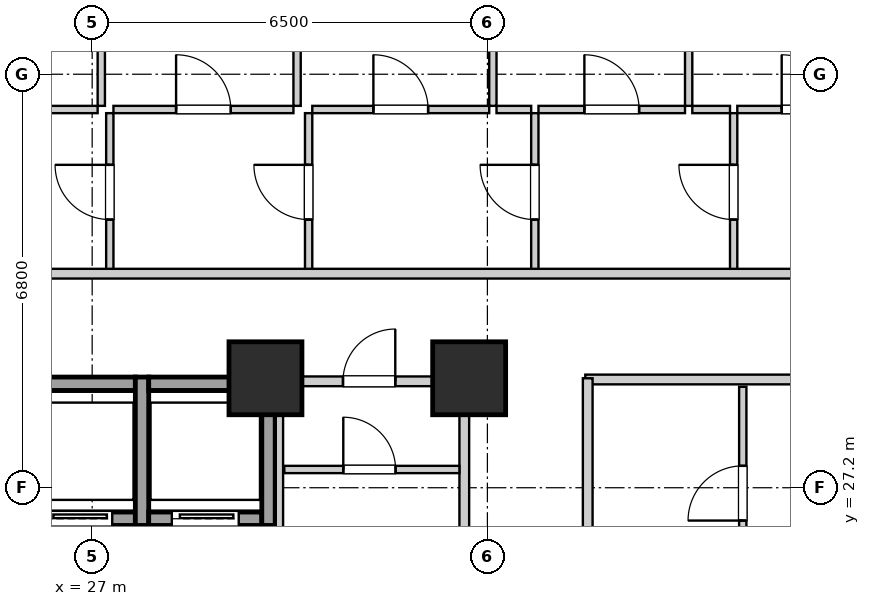
"""IFC4 building model, lengths in metres.
Left out: names, types, materials, properties, quantities, classifications, styles, units other than length and angle.
Written with IfcOpenShell. Run it as: python <this file> out.ifc"""

import sys

from ifc_helpers import new_model, si_unit, direction, frame, frame_2d, origin, origin_2d, place, context, subcontext, project, spatial, rectangle, extrude, element, fill, save


model = new_model("IFC4")
c1 = context("Model", 3, precision=1e-05, world=origin(), true_north=direction((0.0, 1.0)))
c2 = subcontext(c1, "Body", "Model", "MODEL_VIEW")
j1 = project(units=[si_unit("LENGTHUNIT", "METRE"), si_unit("PLANEANGLEUNIT", "RADIAN")], contexts=[c1])
p1 = place(None, origin())
s1 = spatial("IfcSite", under=j1, at=p1, CompositionType="ELEMENT")
p2 = place(p1, origin())
s2 = spatial("IfcBuilding", under=s1, at=p2, CompositionType="ELEMENT")
p3 = place(p2, frame((0.0, 0.0, 41.8)))
s3 = spatial("IfcBuildingStorey", under=s2, at=p3, CompositionType="ELEMENT", Elevation=41.8)
for number, where, z_axis, x_axis in (
    (1, (29.85, 29.0, 0.0), (0.0, 0.0, 1.0), (1.0, 0.0, 0.0)),
    (2, (33.2, 29.0, 0.0), (0.0, 0.0, 1.0), (1.0, 0.0, 0.0)),
):
    element("IfcColumn", number, at=place(p3, frame(where, z_axis=z_axis, x_axis=x_axis)), inside=s3, PredefinedType="COLUMN", context=c2, shape_type="SweptSolid", body=[
        extrude(rectangle(XDim=1.2, YDim=1.2, at=origin_2d()), origin(), (0.0, 0.0, 1.0), 3.2),
    ])
p4 = place(p3, frame((25.85, 26.69, 0.0), z_axis=(0.0, 0.0, 1.0), x_axis=(1.0, 0.0, 0.0)))
e3 = element("IfcWall", 3, at=p4, inside=s3, PredefinedType="SHEAR", context=c2, shape_type="SweptSolid", body=[
    extrude(rectangle(XDim=1.86, YDim=0.22, at=frame_2d((0.93, 0.0))), origin(), (0.0, 0.0, 1.0), 2.94),
])
p5 = place(p4, frame((0.38, 0.0, 0.0)))
e4 = element("IfcOpeningElement", 4, at=p5, cuts=e3, PredefinedType="OPENING", context=c2, shape_type="SweptSolid", body=[
    extrude(rectangle(XDim=1.1, YDim=2.15, at=frame_2d((0.55, 1.075))), frame((0.0, 0.12, 0.0), z_axis=(0.0, -1.0, 0.0), x_axis=(1.0, 0.0, 0.0)), (0.0, 0.0, 1.0), 0.24),
])
p6 = place(p3, frame((25.85, 28.91, 0.0), z_axis=(0.0, 0.0, 1.0), x_axis=(1.0, 0.0, 0.0)))
e5 = element("IfcWall", 5, at=p6, inside=s3, PredefinedType="SHEAR", context=c2, shape_type="SweptSolid", body=[
    extrude(rectangle(XDim=1.86, YDim=0.22, at=frame_2d((0.93, 0.0))), origin(), (0.0, 0.0, 1.0), 2.94),
])
p7 = place(p3, frame((27.82, 26.58, 0.0), z_axis=(0.0, 0.0, 1.0), x_axis=(0.0, 1.0, 0.0)))
e6 = element("IfcWall", 6, at=p7, inside=s3, PredefinedType="SHEAR", context=c2, shape_type="SweptSolid", body=[
    extrude(rectangle(XDim=2.44, YDim=0.22, at=frame_2d((1.22, 0.0))), origin(), (0.0, 0.0, 1.0), 2.94),
])
p8 = place(p3, frame((27.93, 26.69, 0.0), z_axis=(0.0, 0.0, 1.0), x_axis=(1.0, 0.0, 0.0)))
e7 = element("IfcWall", 7, at=p8, inside=s3, PredefinedType="SHEAR", context=c2, shape_type="SweptSolid", body=[
    extrude(rectangle(XDim=1.86, YDim=0.22, at=frame_2d((0.93, 0.0))), origin(), (0.0, 0.0, 1.0), 2.94),
])
p9 = place(p8, frame((0.38, 0.0, 0.0)))
e8 = element("IfcOpeningElement", 8, at=p9, cuts=e7, PredefinedType="OPENING", context=c2, shape_type="SweptSolid", body=[
    extrude(rectangle(XDim=1.1, YDim=2.15, at=frame_2d((0.55, 1.075))), frame((0.0, 0.12, 0.0), z_axis=(0.0, -1.0, 0.0), x_axis=(1.0, 0.0, 0.0)), (0.0, 0.0, 1.0), 0.24),
])
p10 = place(p3, frame((27.93, 28.91, 0.0), z_axis=(0.0, 0.0, 1.0), x_axis=(1.0, 0.0, 0.0)))
e9 = element("IfcWall", 9, at=p10, inside=s3, PredefinedType="SHEAR", context=c2, shape_type="SweptSolid", body=[
    extrude(rectangle(XDim=1.86, YDim=0.22, at=frame_2d((0.93, 0.0))), origin(), (0.0, 0.0, 1.0), 2.94),
])
p11 = place(p3, frame((29.9, 26.58, 0.0), z_axis=(0.0, 0.0, 1.0), x_axis=(0.0, 1.0, 0.0)))
e10 = element("IfcWall", 10, at=p11, inside=s3, PredefinedType="SHEAR", context=c2, shape_type="SweptSolid", body=[
    extrude(rectangle(XDim=2.44, YDim=0.22, at=frame_2d((1.22, 0.0))), origin(), (0.0, 0.0, 1.0), 2.94),
])
p12 = place(p3, frame((33.12, 24.12, 0.0), z_axis=(0.0, 0.0, 1.0), x_axis=(0.0, 1.0, 0.0)))
e11 = element("IfcWall", 11, at=p12, inside=s3, PredefinedType="PARTITIONING", context=c2, shape_type="SweptSolid", body=[
    extrude(rectangle(XDim=4.76, YDim=0.16, at=frame_2d((2.38, 0.0))), origin(), (0.0, 0.0, 1.0), 2.94),
])
p13 = place(p3, frame((30.08, 26.18, 0.0), z_axis=(0.0, 0.0, 1.0), x_axis=(0.0, 1.0, 0.0)))
e12 = element("IfcWall", 12, at=p13, inside=s3, PredefinedType="PARTITIONING", context=c2, shape_type="SweptSolid", body=[
    extrude(rectangle(XDim=2.68, YDim=0.12, at=frame_2d((1.34, 0.0))), origin(), (0.0, 0.0, 1.0), 2.94),
])
p14 = place(p3, frame((30.16, 27.5, 0.0), z_axis=(0.0, 0.0, 1.0), x_axis=(1.0, 0.0, 0.0)))
e13 = element("IfcWall", 13, at=p14, inside=s3, PredefinedType="PARTITIONING", context=c2, shape_type="SweptSolid", body=[
    extrude(rectangle(XDim=2.88, YDim=0.12, at=frame_2d((1.44, 0.0))), origin(), (0.0, 0.0, 1.0), 2.94),
])
p15 = place(p14, frame((0.97, 0.0, 0.0)))
e14 = element("IfcOpeningElement", 14, at=p15, cuts=e13, PredefinedType="OPENING", context=c2, shape_type="SweptSolid", body=[
    extrude(rectangle(XDim=0.86, YDim=2.05, at=frame_2d((0.43, 1.025))), frame((0.0, 0.07, 0.0), z_axis=(0.0, -1.0, 0.0), x_axis=(1.0, 0.0, 0.0)), (0.0, 0.0, 1.0), 0.14),
])
p16 = place(p3, frame((30.08, 28.95, 0.0), z_axis=(0.0, 0.0, 1.0), x_axis=(1.0, 0.0, 0.0)))
e15 = element("IfcWall", 15, at=p16, inside=s3, PredefinedType="PARTITIONING", context=c2, shape_type="SweptSolid", body=[
    extrude(rectangle(XDim=2.96, YDim=0.16, at=frame_2d((1.48, 0.0))), origin(), (0.0, 0.0, 1.0), 2.94),
])
p17 = place(p16, frame((1.045, 0.0, 0.0)))
e16 = element("IfcOpeningElement", 16, at=p17, cuts=e15, PredefinedType="OPENING", context=c2, shape_type="SweptSolid", body=[
    extrude(rectangle(XDim=0.86, YDim=2.05, at=frame_2d((0.43, 1.025))), frame((0.0, 0.09, 0.0), z_axis=(0.0, -1.0, 0.0), x_axis=(1.0, 0.0, 0.0)), (0.0, 0.0, 1.0), 0.18),
])
p18 = place(p3, frame((35.11, 28.98, 0.0), z_axis=(0.0, 0.0, 1.0), x_axis=(1.0, 0.0, 0.0)))
e17 = element("IfcWall", 17, at=p18, inside=s3, PredefinedType="PARTITIONING", context=c2, shape_type="SweptSolid", body=[
    extrude(rectangle(XDim=11.11, YDim=0.16, at=frame_2d((5.555, 0.0))), origin(), (0.0, 0.0, 1.0), 2.155),
])
p19 = place(p3, frame((27.29, 30.76, 0.0), z_axis=(0.0, 0.0, 1.0), x_axis=(0.0, 1.0, 0.0)))
e18 = element("IfcWall", 18, at=p19, inside=s3, PredefinedType="PARTITIONING", context=c2, shape_type="SweptSolid", body=[
    extrude(rectangle(XDim=2.6, YDim=0.12, at=frame_2d((1.3, 0.0))), origin(), (0.0, 0.0, 1.0), 2.94),
])
p20 = place(p19, frame((0.85, 0.0, 0.0)))
e19 = element("IfcOpeningElement", 19, at=p20, cuts=e18, PredefinedType="OPENING", context=c2, shape_type="SweptSolid", body=[
    extrude(rectangle(XDim=0.9, YDim=2.05, at=frame_2d((0.45, 1.025))), frame((0.0, 0.07, 0.0), z_axis=(0.0, -1.0, 0.0), x_axis=(1.0, 0.0, 0.0)), (0.0, 0.0, 1.0), 0.14),
])
p21 = place(p3, frame((23.99, 33.42, 0.0), z_axis=(0.0, 0.0, 1.0), x_axis=(1.0, 0.0, 0.0)))
e20 = element("IfcWall", 20, at=p21, inside=s3, PredefinedType="PARTITIONING", context=c2, shape_type="SweptSolid", body=[
    extrude(rectangle(XDim=3.1, YDim=0.12, at=frame_2d((1.55, 0.0))), origin(), (0.0, 0.0, 1.0), 2.94),
])
p22 = place(p21, frame((1.1, 0.0, 0.0)))
e21 = element("IfcOpeningElement", 21, at=p22, cuts=e20, PredefinedType="OPENING", context=c2, shape_type="SweptSolid", body=[
    extrude(rectangle(XDim=0.9, YDim=2.05, at=frame_2d((0.45, 1.025))), frame((0.0, 0.07, 0.0), z_axis=(0.0, -1.0, 0.0), x_axis=(1.0, 0.0, 0.0)), (0.0, 0.0, 1.0), 0.14),
])
p23 = place(p3, frame((30.56, 30.76, 0.0), z_axis=(0.0, 0.0, 1.0), x_axis=(0.0, 1.0, 0.0)))
e22 = element("IfcWall", 22, at=p23, inside=s3, PredefinedType="PARTITIONING", context=c2, shape_type="SweptSolid", body=[
    extrude(rectangle(XDim=2.6, YDim=0.12, at=frame_2d((1.3, 0.0))), origin(), (0.0, 0.0, 1.0), 2.94),
])
p24 = place(p23, frame((0.85, 0.0, 0.0)))
e23 = element("IfcOpeningElement", 23, at=p24, cuts=e22, PredefinedType="OPENING", context=c2, shape_type="SweptSolid", body=[
    extrude(rectangle(XDim=0.9, YDim=2.05, at=frame_2d((0.45, 1.025))), frame((0.0, 0.07, 0.0), z_axis=(0.0, -1.0, 0.0), x_axis=(1.0, 0.0, 0.0)), (0.0, 0.0, 1.0), 0.14),
])
p25 = place(p3, frame((27.35, 33.42, 0.0), z_axis=(0.0, 0.0, 1.0), x_axis=(1.0, 0.0, 0.0)))
e24 = element("IfcWall", 24, at=p25, inside=s3, PredefinedType="PARTITIONING", context=c2, shape_type="SweptSolid", body=[
    extrude(rectangle(XDim=2.96, YDim=0.12, at=frame_2d((1.48, 0.0))), origin(), (0.0, 0.0, 1.0), 2.94),
])
p26 = place(p25, frame((1.03, 0.0, 0.0)))
e25 = element("IfcOpeningElement", 25, at=p26, cuts=e24, PredefinedType="OPENING", context=c2, shape_type="SweptSolid", body=[
    extrude(rectangle(XDim=0.9, YDim=2.05, at=frame_2d((0.45, 1.025))), frame((0.0, 0.07, 0.0), z_axis=(0.0, -1.0, 0.0), x_axis=(1.0, 0.0, 0.0)), (0.0, 0.0, 1.0), 0.14),
])
p27 = place(p3, frame((34.28, 30.76, 0.0), z_axis=(0.0, 0.0, 1.0), x_axis=(0.0, 1.0, 0.0)))
e26 = element("IfcWall", 26, at=p27, inside=s3, PredefinedType="PARTITIONING", context=c2, shape_type="SweptSolid", body=[
    extrude(rectangle(XDim=2.6, YDim=0.12, at=frame_2d((1.3, 0.0))), origin(), (0.0, 0.0, 1.0), 2.94),
])
p28 = place(p27, frame((0.85, 0.0, 0.0)))
e27 = element("IfcOpeningElement", 27, at=p28, cuts=e26, PredefinedType="OPENING", context=c2, shape_type="SweptSolid", body=[
    extrude(rectangle(XDim=0.9, YDim=2.05, at=frame_2d((0.45, 1.025))), frame((0.0, 0.07, 0.0), z_axis=(0.0, -1.0, 0.0), x_axis=(1.0, 0.0, 0.0)), (0.0, 0.0, 1.0), 0.14),
])
p29 = place(p3, frame((30.62, 33.42, 0.0), z_axis=(0.0, 0.0, 1.0), x_axis=(1.0, 0.0, 0.0)))
e28 = element("IfcWall", 28, at=p29, inside=s3, PredefinedType="PARTITIONING", context=c2, shape_type="SweptSolid", body=[
    extrude(rectangle(XDim=2.91, YDim=0.12, at=frame_2d((1.455, 0.0))), origin(), (0.0, 0.0, 1.0), 2.94),
])
p30 = place(p29, frame((1.005, 0.0, 0.0)))
e29 = element("IfcOpeningElement", 29, at=p30, cuts=e28, PredefinedType="OPENING", context=c2, shape_type="SweptSolid", body=[
    extrude(rectangle(XDim=0.9, YDim=2.05, at=frame_2d((0.45, 1.025))), frame((0.0, 0.07, 0.0), z_axis=(0.0, -1.0, 0.0), x_axis=(1.0, 0.0, 0.0)), (0.0, 0.0, 1.0), 0.14),
])
p31 = place(p3, frame((33.65, 33.42, 0.0), z_axis=(0.0, 0.0, 1.0), x_axis=(1.0, 0.0, 0.0)))
e30 = element("IfcWall", 30, at=p31, inside=s3, PredefinedType="PARTITIONING", context=c2, shape_type="SweptSolid", body=[
    extrude(rectangle(XDim=0.57, YDim=0.12, at=frame_2d((0.285, 0.0))), origin(), (0.0, 0.0, 1.0), 2.94),
])
p32 = place(p3, frame((37.55, 30.76, 0.0), z_axis=(0.0, 0.0, 1.0), x_axis=(0.0, 1.0, 0.0)))
e31 = element("IfcWall", 31, at=p32, inside=s3, PredefinedType="PARTITIONING", context=c2, shape_type="SweptSolid", body=[
    extrude(rectangle(XDim=2.6, YDim=0.12, at=frame_2d((1.3, 0.0))), origin(), (0.0, 0.0, 1.0), 2.94),
])
p33 = place(p32, frame((0.85, 0.0, 0.0)))
e32 = element("IfcOpeningElement", 32, at=p33, cuts=e31, PredefinedType="OPENING", context=c2, shape_type="SweptSolid", body=[
    extrude(rectangle(XDim=0.9, YDim=2.05, at=frame_2d((0.45, 1.025))), frame((0.0, 0.07, 0.0), z_axis=(0.0, -1.0, 0.0), x_axis=(1.0, 0.0, 0.0)), (0.0, 0.0, 1.0), 0.14),
])
p34 = place(p3, frame((34.34, 33.42, 0.0), z_axis=(0.0, 0.0, 1.0), x_axis=(1.0, 0.0, 0.0)))
e33 = element("IfcWall", 33, at=p34, inside=s3, PredefinedType="PARTITIONING", context=c2, shape_type="SweptSolid", body=[
    extrude(rectangle(XDim=2.41, YDim=0.12, at=frame_2d((1.205, 0.0))), origin(), (0.0, 0.0, 1.0), 2.94),
])
p35 = place(p34, frame((0.755, 0.0, 0.0)))
e34 = element("IfcOpeningElement", 34, at=p35, cuts=e33, PredefinedType="OPENING", context=c2, shape_type="SweptSolid", body=[
    extrude(rectangle(XDim=0.9, YDim=2.05, at=frame_2d((0.45, 1.025))), frame((0.0, 0.07, 0.0), z_axis=(0.0, -1.0, 0.0), x_axis=(1.0, 0.0, 0.0)), (0.0, 0.0, 1.0), 0.14),
])
p36 = place(p3, frame((36.87, 33.42, 0.0), z_axis=(0.0, 0.0, 1.0), x_axis=(1.0, 0.0, 0.0)))
e35 = element("IfcWall", 35, at=p36, inside=s3, PredefinedType="PARTITIONING", context=c2, shape_type="SweptSolid", body=[
    extrude(rectangle(XDim=0.62, YDim=0.12, at=frame_2d((0.31, 0.0))), origin(), (0.0, 0.0, 1.0), 2.94),
])
p37 = place(p3, frame((37.61, 33.42, 0.0), z_axis=(0.0, 0.0, 1.0), x_axis=(1.0, 0.0, 0.0)))
e36 = element("IfcWall", 36, at=p37, inside=s3, PredefinedType="PARTITIONING", context=c2, shape_type="SweptSolid", body=[
    extrude(rectangle(XDim=2.36, YDim=0.12, at=frame_2d((1.18, 0.0))), origin(), (0.0, 0.0, 1.0), 2.94),
])
p38 = place(p37, frame((0.73, 0.0, 0.0)))
e37 = element("IfcOpeningElement", 37, at=p38, cuts=e36, PredefinedType="OPENING", context=c2, shape_type="SweptSolid", body=[
    extrude(rectangle(XDim=0.9, YDim=2.05, at=frame_2d((0.45, 1.025))), frame((0.0, 0.07, 0.0), z_axis=(0.0, -1.0, 0.0), x_axis=(1.0, 0.0, 0.0)), (0.0, 0.0, 1.0), 0.14),
])
p39 = place(p3, frame((27.15, 33.48, 0.0), z_axis=(0.0, 0.0, 1.0), x_axis=(0.0, 1.0, 0.0)))
e38 = element("IfcWall", 38, at=p39, inside=s3, PredefinedType="PARTITIONING", context=c2, shape_type="SweptSolid", body=[
    extrude(rectangle(XDim=13.84, YDim=0.12, at=frame_2d((6.92, 0.0))), origin(), (0.0, 0.0, 1.0), 2.94),
])
p40 = place(p39, frame((6.455, 0.0, 0.0)))
e39 = element("IfcOpeningElement", 39, at=p40, cuts=e38, PredefinedType="OPENING", context=c2, shape_type="SweptSolid", body=[
    extrude(rectangle(XDim=0.9, YDim=2.05, at=frame_2d((0.45, 1.025))), frame((0.0, 0.07, 0.0), z_axis=(0.0, -1.0, 0.0), x_axis=(1.0, 0.0, 0.0)), (0.0, 0.0, 1.0), 0.14),
])
p41 = place(p3, frame((30.37, 33.48, 0.0), z_axis=(0.0, 0.0, 1.0), x_axis=(0.0, 1.0, 0.0)))
e40 = element("IfcWall", 40, at=p41, inside=s3, PredefinedType="PARTITIONING", context=c2, shape_type="SweptSolid", body=[
    extrude(rectangle(XDim=13.84, YDim=0.12, at=frame_2d((6.92, 0.0))), origin(), (0.0, 0.0, 1.0), 2.94),
])
p42 = place(p41, frame((6.455, 0.0, 0.0)))
e41 = element("IfcOpeningElement", 41, at=p42, cuts=e40, PredefinedType="OPENING", context=c2, shape_type="SweptSolid", body=[
    extrude(rectangle(XDim=0.9, YDim=2.05, at=frame_2d((0.45, 1.025))), frame((0.0, 0.07, 0.0), z_axis=(0.0, -1.0, 0.0), x_axis=(1.0, 0.0, 0.0)), (0.0, 0.0, 1.0), 0.14),
])
p43 = place(p3, frame((33.59, 33.48, 0.0), z_axis=(0.0, 0.0, 1.0), x_axis=(0.0, 1.0, 0.0)))
e42 = element("IfcWall", 42, at=p43, inside=s3, PredefinedType="PARTITIONING", context=c2, shape_type="SweptSolid", body=[
    extrude(rectangle(XDim=13.84, YDim=0.12, at=frame_2d((6.92, 0.0))), origin(), (0.0, 0.0, 1.0), 2.94),
])
p44 = place(p43, frame((6.455, 0.0, 0.0)))
e43 = element("IfcOpeningElement", 43, at=p44, cuts=e42, PredefinedType="OPENING", context=c2, shape_type="SweptSolid", body=[
    extrude(rectangle(XDim=0.9, YDim=2.05, at=frame_2d((0.45, 1.025))), frame((0.0, 0.07, 0.0), z_axis=(0.0, -1.0, 0.0), x_axis=(1.0, 0.0, 0.0)), (0.0, 0.0, 1.0), 0.14),
])
p45 = place(p3, frame((36.81, 33.48, 0.0), z_axis=(0.0, 0.0, 1.0), x_axis=(0.0, 1.0, 0.0)))
e44 = element("IfcWall", 44, at=p45, inside=s3, PredefinedType="PARTITIONING", context=c2, shape_type="SweptSolid", body=[
    extrude(rectangle(XDim=11.69, YDim=0.12, at=frame_2d((5.845, 0.0))), origin(), (0.0, 0.0, 1.0), 2.94),
])
p46 = place(p45, frame((5.395, 0.0, 0.0)))
e45 = element("IfcOpeningElement", 45, at=p46, cuts=e44, PredefinedType="OPENING", context=c2, shape_type="SweptSolid", body=[
    extrude(rectangle(XDim=0.9, YDim=2.05, at=frame_2d((0.45, 1.025))), frame((0.0, 0.07, 0.0), z_axis=(0.0, -1.0, 0.0), x_axis=(1.0, 0.0, 0.0)), (0.0, 0.0, 1.0), 0.14),
])
p47 = place(p3, frame((37.7, 25.361, 0.0), z_axis=(0.0, 0.0, 1.0), x_axis=(0.0, 1.0, 0.0)))
e46 = element("IfcWall", 46, at=p47, inside=s3, PredefinedType="PARTITIONING", context=c2, shape_type="SweptSolid", body=[
    extrude(rectangle(XDim=3.499, YDim=0.12, at=frame_2d((1.75, 0.0))), origin(), (0.0, 0.0, 1.0), 2.94),
])
p48 = place(p47, frame((1.299, 0.0, 0.0)))
e47 = element("IfcOpeningElement", 47, at=p48, cuts=e46, PredefinedType="OPENING", context=c2, shape_type="SweptSolid", body=[
    extrude(rectangle(XDim=0.9, YDim=2.05, at=frame_2d((0.45, 1.025))), frame((0.0, 0.07, 0.0), z_axis=(0.0, -1.0, 0.0), x_axis=(1.0, 0.0, 0.0)), (0.0, 0.0, 1.0), 0.14),
])
p49 = place(p3, frame((10.05, 30.72, 0.0), z_axis=(0.0, 0.0, 1.0), x_axis=(1.0, 0.0, 0.0)))
e48 = element("IfcWall", 48, at=p49, inside=s3, PredefinedType="PARTITIONING", context=c2, shape_type="SweptSolid", body=[
    extrude(rectangle(XDim=33.9, YDim=0.16, at=frame_2d((16.95, 0.0))), origin(), (0.0, 0.0, 1.0), 2.94),
])
p50 = place(p49, frame((4.035, 0.0, 0.0)))
e49 = element("IfcOpeningElement", 49, at=p50, cuts=e48, PredefinedType="OPENING", context=c2, shape_type="SweptSolid", body=[
    extrude(rectangle(XDim=0.95, YDim=2.1, at=frame_2d((0.475, 1.05))), frame((0.0, 0.09, 0.0), z_axis=(0.0, -1.0, 0.0), x_axis=(1.0, 0.0, 0.0)), (0.0, 0.0, 1.0), 0.18),
])
p51 = place(p3, frame((35.15, 15.07, 0.0), z_axis=(0.0, 0.0, 1.0), x_axis=(0.0, 1.0, 0.0)))
e50 = element("IfcWall", 50, at=p51, inside=s3, PredefinedType="PARTITIONING", context=c2, shape_type="SweptSolid", body=[
    extrude(rectangle(XDim=13.93, YDim=0.16, at=frame_2d((6.965, 0.0))), origin(), (0.0, 0.0, 1.0), 2.94),
])
p52 = place(p51, frame((4.385, 0.0, 0.0)))
e51 = element("IfcOpeningElement", 51, at=p52, cuts=e50, PredefinedType="OPENING", context=c2, shape_type="SweptSolid", body=[
    extrude(rectangle(XDim=0.95, YDim=2.1, at=frame_2d((0.475, 1.05))), frame((0.0, 0.09, 0.0), z_axis=(0.0, -1.0, 0.0), x_axis=(1.0, 0.0, 0.0)), (0.0, 0.0, 1.0), 0.18),
])
p53 = place(p5, origin())
e52 = element("IfcDoor", 52, at=p53, inside=s3, OperationType="SLIDING_TO_LEFT", PredefinedType="DOOR", context=c2, shape_type="SweptSolid", body=[
    extrude(rectangle(XDim=1.1, YDim=2.15, at=frame_2d((0.55, 1.075))), frame((0.0, 0.025, 0.0), z_axis=(0.0, -1.0, 0.0), x_axis=(1.0, 0.0, 0.0)), (0.0, 0.0, 1.0), 0.05),
])
fill(e4, e52)
p54 = place(p9, origin())
e53 = element("IfcDoor", 53, at=p54, inside=s3, OperationType="SLIDING_TO_LEFT", PredefinedType="DOOR", context=c2, shape_type="SweptSolid", body=[
    extrude(rectangle(XDim=1.1, YDim=2.15, at=frame_2d((0.55, 1.075))), frame((0.0, 0.025, 0.0), z_axis=(0.0, -1.0, 0.0), x_axis=(1.0, 0.0, 0.0)), (0.0, 0.0, 1.0), 0.05),
])
fill(e8, e53)
p55 = place(p15, origin())
e54 = element("IfcDoor", 54, at=p55, inside=s3, OperationType="SINGLE_SWING_LEFT", PredefinedType="DOOR", context=c2, shape_type="SweptSolid", body=[
    extrude(rectangle(XDim=0.86, YDim=2.05, at=frame_2d((0.43, 1.025))), frame((0.0, 0.025, 0.0), z_axis=(0.0, -1.0, 0.0), x_axis=(1.0, 0.0, 0.0)), (0.0, 0.0, 1.0), 0.05),
])
fill(e14, e54)
p56 = place(p17, origin())
e55 = element("IfcDoor", 55, at=p56, inside=s3, OperationType="SINGLE_SWING_RIGHT", PredefinedType="DOOR", context=c2, shape_type="SweptSolid", body=[
    extrude(rectangle(XDim=0.86, YDim=2.05, at=frame_2d((0.43, 1.025))), frame((0.0, 0.025, 0.0), z_axis=(0.0, -1.0, 0.0), x_axis=(1.0, 0.0, 0.0)), (0.0, 0.0, 1.0), 0.05),
])
fill(e16, e55)
p57 = place(p20, origin())
e56 = element("IfcDoor", 56, at=p57, inside=s3, OperationType="SINGLE_SWING_RIGHT", PredefinedType="DOOR", context=c2, shape_type="SweptSolid", body=[
    extrude(rectangle(XDim=0.9, YDim=2.05, at=frame_2d((0.45, 1.025))), frame((0.0, 0.025, 0.0), z_axis=(0.0, -1.0, 0.0), x_axis=(1.0, 0.0, 0.0)), (0.0, 0.0, 1.0), 0.05),
])
fill(e19, e56)
p58 = place(p24, origin())
e57 = element("IfcDoor", 57, at=p58, inside=s3, OperationType="SINGLE_SWING_RIGHT", PredefinedType="DOOR", context=c2, shape_type="SweptSolid", body=[
    extrude(rectangle(XDim=0.9, YDim=2.05, at=frame_2d((0.45, 1.025))), frame((0.0, 0.025, 0.0), z_axis=(0.0, -1.0, 0.0), x_axis=(1.0, 0.0, 0.0)), (0.0, 0.0, 1.0), 0.05),
])
fill(e23, e57)
p59 = place(p26, origin())
e58 = element("IfcDoor", 58, at=p59, inside=s3, OperationType="SINGLE_SWING_LEFT", PredefinedType="DOOR", context=c2, shape_type="SweptSolid", body=[
    extrude(rectangle(XDim=0.9, YDim=2.05, at=frame_2d((0.45, 1.025))), frame((0.0, 0.025, 0.0), z_axis=(0.0, -1.0, 0.0), x_axis=(1.0, 0.0, 0.0)), (0.0, 0.0, 1.0), 0.05),
])
fill(e25, e58)
p60 = place(p28, origin())
e59 = element("IfcDoor", 59, at=p60, inside=s3, OperationType="SINGLE_SWING_RIGHT", PredefinedType="DOOR", context=c2, shape_type="SweptSolid", body=[
    extrude(rectangle(XDim=0.9, YDim=2.05, at=frame_2d((0.45, 1.025))), frame((0.0, 0.025, 0.0), z_axis=(0.0, -1.0, 0.0), x_axis=(1.0, 0.0, 0.0)), (0.0, 0.0, 1.0), 0.05),
])
fill(e27, e59)
p61 = place(p30, origin())
e60 = element("IfcDoor", 60, at=p61, inside=s3, OperationType="SINGLE_SWING_LEFT", PredefinedType="DOOR", context=c2, shape_type="SweptSolid", body=[
    extrude(rectangle(XDim=0.9, YDim=2.05, at=frame_2d((0.45, 1.025))), frame((0.0, 0.025, 0.0), z_axis=(0.0, -1.0, 0.0), x_axis=(1.0, 0.0, 0.0)), (0.0, 0.0, 1.0), 0.05),
])
fill(e29, e60)
p62 = place(p33, origin())
e61 = element("IfcDoor", 61, at=p62, inside=s3, OperationType="SINGLE_SWING_RIGHT", PredefinedType="DOOR", context=c2, shape_type="SweptSolid", body=[
    extrude(rectangle(XDim=0.9, YDim=2.05, at=frame_2d((0.45, 1.025))), frame((0.0, 0.025, 0.0), z_axis=(0.0, -1.0, 0.0), x_axis=(1.0, 0.0, 0.0)), (0.0, 0.0, 1.0), 0.05),
])
fill(e32, e61)
p63 = place(p35, origin())
e62 = element("IfcDoor", 62, at=p63, inside=s3, OperationType="SINGLE_SWING_LEFT", PredefinedType="DOOR", context=c2, shape_type="SweptSolid", body=[
    extrude(rectangle(XDim=0.9, YDim=2.05, at=frame_2d((0.45, 1.025))), frame((0.0, 0.025, 0.0), z_axis=(0.0, -1.0, 0.0), x_axis=(1.0, 0.0, 0.0)), (0.0, 0.0, 1.0), 0.05),
])
fill(e34, e62)
p64 = place(p38, origin())
e63 = element("IfcDoor", 63, at=p64, inside=s3, OperationType="SINGLE_SWING_LEFT", PredefinedType="DOOR", context=c2, shape_type="SweptSolid", body=[
    extrude(rectangle(XDim=0.9, YDim=2.05, at=frame_2d((0.45, 1.025))), frame((0.0, 0.025, 0.0), z_axis=(0.0, -1.0, 0.0), x_axis=(1.0, 0.0, 0.0)), (0.0, 0.0, 1.0), 0.05),
])
fill(e37, e63)
p65 = place(p48, origin())
e64 = element("IfcDoor", 64, at=p65, inside=s3, OperationType="SINGLE_SWING_LEFT", PredefinedType="DOOR", context=c2, shape_type="SweptSolid", body=[
    extrude(rectangle(XDim=0.9, YDim=2.05, at=frame_2d((0.45, 1.025))), frame((0.0, 0.025, 0.0), z_axis=(0.0, -1.0, 0.0), x_axis=(1.0, 0.0, 0.0)), (0.0, 0.0, 1.0), 0.05),
])
fill(e47, e64)
save(model, sys.argv[1])
